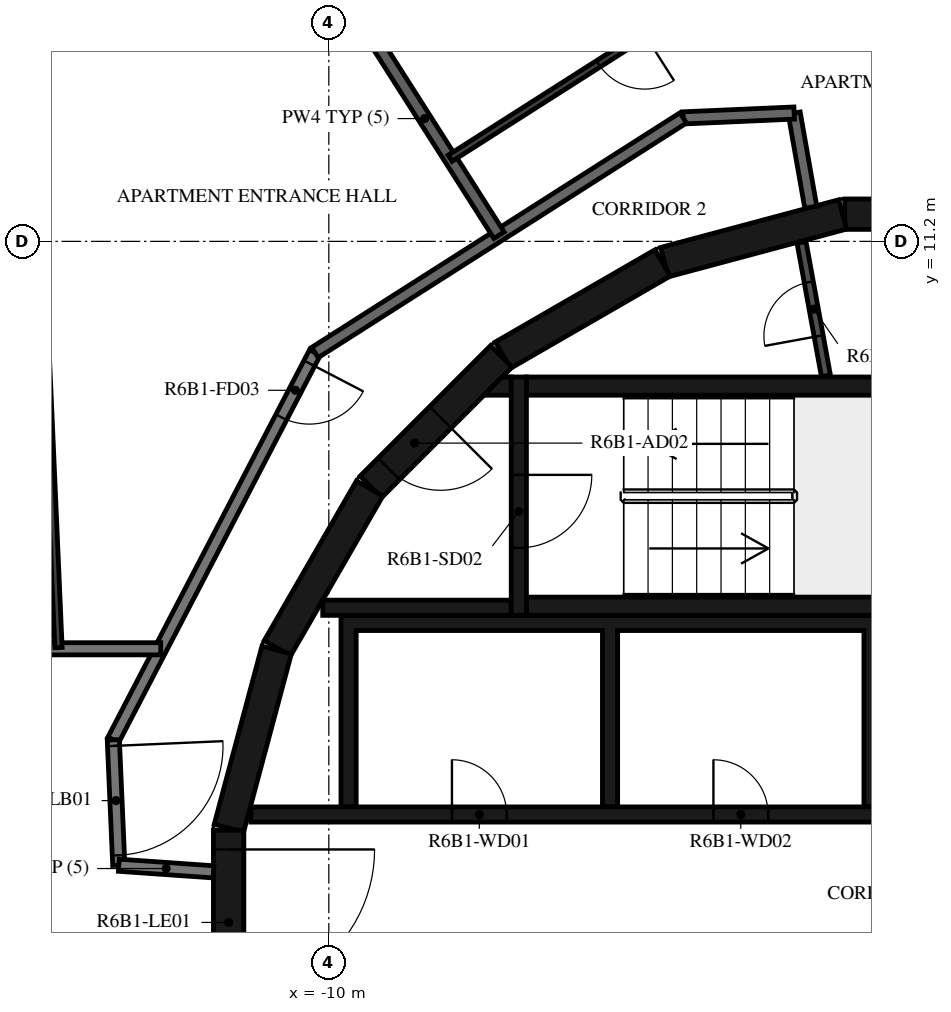
"""IFC4 building model, lengths in metres.
Left out: names, types, materials, properties, quantities, classifications, styles, units other than length and angle.
Written with IfcOpenShell. Run it as: python <this file> out.ifc"""

import sys

from ifc_helpers import new_model, si_unit, direction, frame, frame_2d, origin, place, context, subcontext, project, spatial, polyline, rectangle, outline, extrude, element, fill, save


model = new_model("IFC4")
c1 = context("Model", 3, precision=1e-05, world=origin(), true_north=direction((0.0, 1.0)))
c2 = subcontext(c1, "Body", "Model", "MODEL_VIEW")
j1 = project(units=[si_unit("LENGTHUNIT", "METRE"), si_unit("PLANEANGLEUNIT", "RADIAN")], contexts=[c1])
p1 = place(None, origin())
s1 = spatial("IfcSite", under=j1, at=p1, CompositionType="ELEMENT")
p2 = place(p1, origin())
s2 = spatial("IfcBuilding", under=s1, at=p2, CompositionType="ELEMENT")
p3 = place(p2, frame((0.0, 0.0, 237.2)))
s3 = spatial("IfcBuildingStorey", under=s2, at=p3, CompositionType="ELEMENT", Elevation=237.2)
for number, where, z_axis, x_axis in (
    (1, (1.516, 11.647, 0.0), (0.0, 0.0, 1.0), (-1.0, 0.0, 0.0)),
    (2, (-1.55, 11.643, 0.0), (0.0, 0.0, 1.0), (-0.966, -0.259, 0.0)),
    (3, (-4.51, 10.845, 0.0), (0.0, 0.0, 1.0), (-0.866, -0.5, 0.0)),
):
    element("IfcWall", number, at=place(p3, frame(where, z_axis=z_axis, x_axis=x_axis)), inside=s3, PredefinedType="SHEAR", context=c2, shape_type="SweptSolid", body=[
        extrude(rectangle(XDim=3.033, YDim=0.5, at=frame_2d((1.516, 0.0))), origin(), (0.0, 0.0, 1.0), 3.12),
    ])
p4 = place(p3, frame((-7.164, 9.308, 0.0), z_axis=(0.0, 0.0, 1.0), x_axis=(-0.707106781187, -0.707106781187, 0.0)))
e4 = element("IfcWall", 4, at=p4, inside=s3, PredefinedType="SHEAR", context=c2, shape_type="SweptSolid", body=[
    extrude(rectangle(XDim=3.032, YDim=0.5, at=frame_2d((1.516, 0.0))), origin(), (0.0, 0.0, 1.0), 3.12),
])
p5 = place(p4, frame((1.416, 0.0, 0.0)))
e5 = element("IfcOpeningElement", 5, at=p5, cuts=e4, PredefinedType="OPENING", context=c2, shape_type="SweptSolid", body=[
    extrude(rectangle(XDim=1.2, YDim=2.1, at=frame_2d((0.6, 1.05))), frame((0.0, 0.26, 0.0), z_axis=(0.0, -1.0, 0.0), x_axis=(1.0, 0.0, 0.0)), (0.0, 0.0, 1.0), 0.52),
])
for number, where, z_axis, x_axis in (
    (6, (-9.329, 7.137, 0.0), (0.0, 0.0, 1.0), (-0.5, -0.866, 0.0)),
    (7, (-10.858, 4.479, 0.0), (0.0, 0.0, 1.0), (-0.259, -0.966, 0.0)),
):
    element("IfcWall", number, at=place(p3, frame(where, z_axis=z_axis, x_axis=x_axis)), inside=s3, PredefinedType="SHEAR", context=c2, shape_type="SweptSolid", body=[
        extrude(rectangle(XDim=3.033, YDim=0.5, at=frame_2d((1.516, 0.0))), origin(), (0.0, 0.0, 1.0), 3.12),
    ])
p6 = place(p3, frame((-11.647, 1.516, 0.0), z_axis=(0.0, 0.0, 1.0), x_axis=(0.0, -1.0, 0.0)))
e8 = element("IfcWall", 8, at=p6, inside=s3, PredefinedType="SHEAR", context=c2, shape_type="SweptSolid", body=[
    extrude(rectangle(XDim=3.033, YDim=0.5, at=frame_2d((1.516, 0.0))), origin(), (0.0, 0.0, 1.0), 3.12),
])
p7 = place(p6, frame((0.316, 0.0, 0.0)))
e9 = element("IfcOpeningElement", 9, at=p7, cuts=e8, PredefinedType="OPENING", context=c2, shape_type="SweptSolid", body=[
    extrude(rectangle(XDim=2.4, YDim=2.1, at=frame_2d((1.2, 1.05))), frame((0.0, 0.26, 0.0), z_axis=(0.0, -1.0, 0.0), x_axis=(1.0, 0.0, 0.0)), (0.0, 0.0, 1.0), 0.52),
])
for number, where, z_axis, x_axis in (
    (10, (-6.75, 5.2, 0.0), (0.0, 0.0, 1.0), (1.0, 0.0, 0.0)),
    (11, (-6.75, 8.82, 0.0), (0.0, 0.0, 1.0), (1.0, 0.0, 0.0)),
):
    element("IfcWall", number, at=place(p3, frame(where, z_axis=z_axis, x_axis=x_axis)), inside=s3, PredefinedType="SHEAR", context=c2, shape_type="SweptSolid", body=[
        extrude(rectangle(XDim=6.75, YDim=0.3, at=frame_2d((3.375, 0.0))), origin(), (0.0, 0.0, 1.0), 3.12),
    ])
p8 = place(p3, frame((-6.875, 8.97, 0.0), z_axis=(0.0, 0.0, 1.0), x_axis=(0.0, -1.0, 0.0)))
e12 = element("IfcWall", 12, at=p8, inside=s3, PredefinedType="SHEAR", context=c2, shape_type="SweptSolid", body=[
    extrude(rectangle(XDim=3.92, YDim=0.25, at=frame_2d((1.96, 0.0))), origin(), (0.0, 0.0, 1.0), 3.12),
])
p9 = place(p8, frame((1.61, 0.0, 0.0)))
e13 = element("IfcOpeningElement", 13, at=p9, cuts=e12, PredefinedType="OPENING", context=c2, shape_type="SweptSolid", body=[
    extrude(rectangle(XDim=1.2, YDim=2.1, at=frame_2d((0.6, 1.05))), frame((0.0, 0.135, 0.0), z_axis=(0.0, -1.0, 0.0), x_axis=(1.0, 0.0, 0.0)), (0.0, 0.0, 1.0), 0.27),
])
p10 = place(p3, frame((-7.0, 5.175, 0.0), z_axis=(0.0, 0.0, 1.0), x_axis=(-1.0, 0.0, 0.0)))
e14 = element("IfcWall", 14, at=p10, inside=s3, PredefinedType="SHEAR", context=c2, shape_type="SweptSolid", body=[
    extrude(rectangle(XDim=3.1, YDim=0.25, at=frame_2d((1.55, 0.0))), origin(), (0.0, 0.0, 1.0), 3.12),
])
p11 = place(p3, origin())
e15 = element("IfcWall", 15, at=p11, inside=s3, PredefinedType="SHEAR", context=c2, shape_type="SweptSolid", body=[
    extrude(outline(polyline([(-7.148, 8.97), (-7.0, 8.97), (-7.0, 8.67), (-7.448, 8.67), (-7.148, 8.97)])), origin(), (0.0, 0.0, 1.0), 3.12),
])
p12 = place(p3, origin())
e16 = element("IfcWall", 16, at=p12, inside=s3, PredefinedType="SHEAR", context=c2, shape_type="SweptSolid", body=[
    extrude(outline(polyline([(-9.55, 4.8), (-5.5, 4.8), (-5.5, 1.9), (-5.25, 1.9), (-5.25, 4.8), (-1.2, 4.8), (-1.2, 1.9), (-0.95, 1.9), (-0.95, 4.8), (0.95, 4.8), (0.95, 1.9), (1.2, 1.9), (1.2, 4.8), (3.1, 4.8), (3.1, 1.9), (3.35, 1.9), (3.35, 4.8), (5.25, 4.8), (5.25, 1.9), (5.5, 1.9), (5.5, 4.8), (7.4, 4.8), (7.4, 1.9), (7.65, 1.9), (7.65, 4.8), (9.55, 4.8), (9.55, 1.9), (9.8, 1.9), (9.8, 4.8), (9.8, 5.05), (-9.8, 5.05), (-9.8, 4.8), (-9.8, 1.9), (-9.55, 1.9), (-9.55, 4.8)])), origin(), (0.0, 0.0, 1.0), 3.12),
])
p13 = place(p3, frame((-11.28, 1.775, 0.0), z_axis=(0.0, 0.0, 1.0), x_axis=(1.0, 0.0, 0.0)))
e17 = element("IfcWall", 17, at=p13, inside=s3, PredefinedType="SHEAR", context=c2, shape_type="SweptSolid", body=[
    extrude(rectangle(XDim=14.38, YDim=0.25, at=frame_2d((7.19, 0.0))), origin(), (0.0, 0.0, 1.0), 3.12),
])
p14 = place(p13, frame((10.73, 0.0, 0.0)))
e18 = element("IfcOpeningElement", 18, at=p14, cuts=e17, PredefinedType="OPENING", context=c2, shape_type="SweptSolid", body=[
    extrude(rectangle(XDim=1.1, YDim=2.1, at=frame_2d((0.55, 1.05))), frame((0.0, 0.135, 0.0), z_axis=(0.0, -1.0, 0.0), x_axis=(1.0, 0.0, 0.0)), (0.0, 0.0, 1.0), 0.27),
])
p15 = place(p13, frame((12.88, 0.0, 0.0)))
e19 = element("IfcOpeningElement", 19, at=p15, cuts=e17, PredefinedType="OPENING", context=c2, shape_type="SweptSolid", body=[
    extrude(rectangle(XDim=1.1, YDim=2.1, at=frame_2d((0.55, 1.05))), frame((0.0, 0.135, 0.0), z_axis=(0.0, -1.0, 0.0), x_axis=(1.0, 0.0, 0.0)), (0.0, 0.0, 1.0), 0.27),
])
p16 = place(p13, frame((3.305, 0.0, 0.0)))
e20 = element("IfcOpeningElement", 20, at=p16, cuts=e17, PredefinedType="OPENING", context=c2, shape_type="SweptSolid", body=[
    extrude(rectangle(XDim=0.9, YDim=2.1, at=frame_2d((0.45, 1.05))), frame((0.0, 0.135, 0.0), z_axis=(0.0, -1.0, 0.0), x_axis=(1.0, 0.0, 0.0)), (0.0, 0.0, 1.0), 0.27),
])
p17 = place(p13, frame((7.605, 0.0, 0.0)))
e21 = element("IfcOpeningElement", 21, at=p17, cuts=e17, PredefinedType="OPENING", context=c2, shape_type="SweptSolid", body=[
    extrude(rectangle(XDim=0.9, YDim=2.1, at=frame_2d((0.45, 1.05))), frame((0.0, 0.135, 0.0), z_axis=(0.0, -1.0, 0.0), x_axis=(1.0, 0.0, 0.0)), (0.0, 0.0, 1.0), 0.27),
])
p18 = place(p3, frame((-1.825, 8.99, 0.0), z_axis=(0.0, 0.0, 1.0), x_axis=(-0.179955206115, 0.983674805915, 0.0)))
e22 = element("IfcWall", 22, at=p18, inside=s3, PredefinedType="PARTITIONING", context=c2, shape_type="SweptSolid", body=[
    extrude(rectangle(XDim=2.229, YDim=0.15, at=frame_2d((1.115, 0.0))), origin(), (0.0, 0.0, 1.0), 3.12),
])
p19 = place(p18, frame((0.665, 0.0, 0.0)))
e23 = element("IfcOpeningElement", 23, at=p19, cuts=e22, PredefinedType="OPENING", context=c2, shape_type="SweptSolid", body=[
    extrude(rectangle(XDim=0.9, YDim=2.1, at=frame_2d((0.45, 1.05))), frame((0.0, 0.085, 0.0), z_axis=(0.0, -1.0, 0.0), x_axis=(1.0, 0.0, 0.0)), (0.0, 0.0, 1.0), 0.17),
])
p20 = place(p3, frame((-10.228, 9.372, 0.0), z_axis=(0.0, 0.0, 1.0), x_axis=(-0.461759464021, -0.887005184532, 0.0)))
e24 = element("IfcWall", 24, at=p20, inside=s3, PredefinedType="STANDARD", context=c2, shape_type="SweptSolid", body=[
    extrude(rectangle(XDim=7.181, YDim=0.2, at=frame_2d((3.591, 0.0))), origin(), (0.0, 0.0, 1.0), 3.12),
])
p21 = place(p20, frame((0.2, 0.0, 0.0)))
e25 = element("IfcOpeningElement", 25, at=p21, cuts=e24, PredefinedType="OPENING", context=c2, shape_type="SweptSolid", body=[
    extrude(rectangle(XDim=1.0, YDim=2.1, at=frame_2d((0.5, 1.05))), frame((0.0, 0.11, 0.0), z_axis=(0.0, -1.0, 0.0), x_axis=(1.0, 0.0, 0.0)), (0.0, 0.0, 1.0), 0.22),
])
p22 = place(p3, frame((-13.544, 3.003, 0.0), z_axis=(0.0, 0.0, 1.0), x_axis=(0.043652842459, -0.99904676034, 0.0)))
e26 = element("IfcWall", 26, at=p22, inside=s3, PredefinedType="STANDARD", context=c2, shape_type="SweptSolid", body=[
    extrude(rectangle(XDim=2.064, YDim=0.2, at=frame_2d((1.032, 0.0))), origin(), (0.0, 0.0, 1.0), 3.12),
])
p23 = place(p22, frame((0.1, 0.0, 0.0)))
e27 = element("IfcOpeningElement", 27, at=p23, cuts=e26, PredefinedType="OPENING", context=c2, shape_type="SweptSolid", body=[
    extrude(rectangle(XDim=1.8, YDim=2.1, at=frame_2d((0.9, 1.05))), frame((0.0, 0.11, 0.0), z_axis=(0.0, -1.0, 0.0), x_axis=(1.0, 0.0, 0.0)), (0.0, 0.0, 1.0), 0.22),
])
p24 = place(p3, frame((-13.454, 0.941, 0.0), z_axis=(0.0, 0.0, 1.0), x_axis=(0.99755155062, -0.069934997354, 0.0)))
e28 = element("IfcWall", 28, at=p24, inside=s3, PredefinedType="STANDARD", context=c2, shape_type="SweptSolid", body=[
    extrude(rectangle(XDim=1.561, YDim=0.2, at=frame_2d((0.78, 0.0))), origin(), (0.0, 0.0, 1.0), 3.12),
])
p25 = place(p3, frame((-2.074, 11.761, 0.0), z_axis=(0.0, 0.0, 1.0), x_axis=(-0.173679082312, 0.984802303189, 0.0)))
e29 = element("IfcWall", 29, at=p25, inside=s3, PredefinedType="STANDARD", context=c2, shape_type="SweptSolid", body=[
    extrude(rectangle(XDim=1.573, YDim=0.2, at=frame_2d((0.787, 0.0))), origin(), (0.0, 0.0, 1.0), 3.12),
])
p26 = place(p3, frame((-2.347, 13.31, 0.0), z_axis=(0.0, 0.0, 1.0), x_axis=(-0.999050095671, -0.043576442492, 0.0)))
e30 = element("IfcWall", 30, at=p26, inside=s3, PredefinedType="STANDARD", context=c2, shape_type="SweptSolid", body=[
    extrude(rectangle(XDim=1.826, YDim=0.2, at=frame_2d((0.913, 0.0))), origin(), (0.0, 0.0, 1.0), 3.12),
])
p27 = place(p3, frame((-4.172, 13.231, 0.0), z_axis=(0.0, 0.0, 1.0), x_axis=(-0.843388394728, -0.537304397561, 0.0)))
e31 = element("IfcWall", 31, at=p27, inside=s3, PredefinedType="STANDARD", context=c2, shape_type="SweptSolid", body=[
    extrude(rectangle(XDim=7.181, YDim=0.2, at=frame_2d((3.59, 0.0))), origin(), (0.0, 0.0, 1.0), 3.12),
])
p28 = place(p3, frame((-12.764, 4.5, 0.0), z_axis=(0.0, 0.0, 1.0), x_axis=(-1.0, 0.0, 0.0)))
e32 = element("IfcWall", 32, at=p28, inside=s3, PredefinedType="STANDARD", context=c2, shape_type="SweptSolid", body=[
    extrude(rectangle(XDim=4.086, YDim=0.2, at=frame_2d((2.043, 0.0))), origin(), (0.0, 0.0, 1.0), 3.12),
])
p29 = place(p3, frame((-9.645, 15.138, 0.0), z_axis=(0.0, 0.0, 1.0), x_axis=(0.537267800866, -0.84341170857, 0.0)))
e33 = element("IfcWall", 33, at=p29, inside=s3, PredefinedType="STANDARD", context=c2, shape_type="SweptSolid", body=[
    extrude(rectangle(XDim=4.55, YDim=0.2, at=frame_2d((2.275, 0.0))), origin(), (0.0, 0.0, 1.0), 3.12),
])
p30 = place(p3, frame((-4.639, 14.712, 0.0), z_axis=(0.0, 0.0, 1.0), x_axis=(-0.843376843237, -0.537322529113, 0.0)))
e34 = element("IfcWall", 34, at=p30, inside=s3, PredefinedType="PARTITIONING", context=c2, shape_type="SweptSolid", body=[
    extrude(rectangle(XDim=3.992, YDim=0.12, at=frame_2d((1.996, 0.0))), origin(), (0.0, 0.0, 1.0), 3.12),
])
p31 = place(p30, frame((0.2, 0.0, 0.0)))
e35 = element("IfcOpeningElement", 35, at=p31, cuts=e34, PredefinedType="OPENING", context=c2, shape_type="SweptSolid", body=[
    extrude(rectangle(XDim=0.9, YDim=2.1, at=frame_2d((0.45, 1.05))), frame((0.0, 0.07, 0.0), z_axis=(0.0, -1.0, 0.0), x_axis=(1.0, 0.0, 0.0)), (0.0, 0.0, 1.0), 0.14),
])
p32 = place(p3, frame((-14.955, 16.187, 0.0), z_axis=(0.0, 0.0, 1.0), x_axis=(0.04360777668, -0.999048728448, 0.0)))
e36 = element("IfcWall", 36, at=p32, inside=s3, PredefinedType="PARTITIONING", context=c2, shape_type="SweptSolid", body=[
    extrude(rectangle(XDim=11.679, YDim=0.12, at=frame_2d((5.839, 0.0))), origin(), (0.0, 0.0, 1.0), 3.12),
])
p33 = place(p32, frame((0.709, 0.0, 0.0)))
e37 = element("IfcOpeningElement", 37, at=p33, cuts=e36, PredefinedType="OPENING", context=c2, shape_type="SweptSolid", body=[
    extrude(rectangle(XDim=0.9, YDim=2.1, at=frame_2d((0.45, 1.05))), frame((0.0, 0.07, 0.0), z_axis=(0.0, -1.0, 0.0), x_axis=(1.0, 0.0, 0.0)), (0.0, 0.0, 1.0), 0.14),
])
p34 = place(p9, origin())
e38 = element("IfcDoor", 38, at=p34, inside=s3, OperationType="SINGLE_SWING_LEFT", PredefinedType="DOOR", context=c2, shape_type="SweptSolid", body=[
    extrude(rectangle(XDim=1.2, YDim=2.1, at=frame_2d((0.6, 1.05))), frame((0.0, 0.025, 0.0), z_axis=(0.0, -1.0, 0.0), x_axis=(1.0, 0.0, 0.0)), (0.0, 0.0, 1.0), 0.05),
])
fill(e13, e38)
p35 = place(p5, origin())
e39 = element("IfcDoor", 39, at=p35, inside=s3, OperationType="SINGLE_SWING_RIGHT", PredefinedType="DOOR", context=c2, shape_type="SweptSolid", body=[
    extrude(rectangle(XDim=1.2, YDim=2.1, at=frame_2d((0.6, 1.05))), frame((0.0, 0.025, 0.0), z_axis=(0.0, -1.0, 0.0), x_axis=(1.0, 0.0, 0.0)), (0.0, 0.0, 1.0), 0.05),
])
fill(e5, e39)
p36 = place(p7, origin())
e40 = element("IfcDoor", 40, at=p36, inside=s3, OperationType="DOUBLE_DOOR_SINGLE_SWING", PredefinedType="DOOR", context=c2, shape_type="SweptSolid", body=[
    extrude(rectangle(XDim=2.4, YDim=2.1, at=frame_2d((1.2, 1.05))), frame((0.0, 0.025, 0.0), z_axis=(0.0, -1.0, 0.0), x_axis=(1.0, 0.0, 0.0)), (0.0, 0.0, 1.0), 0.05),
])
fill(e9, e40)
p37 = place(p16, origin())
e41 = element("IfcDoor", 41, at=p37, inside=s3, OperationType="SINGLE_SWING_LEFT", PredefinedType="DOOR", context=c2, shape_type="SweptSolid", body=[
    extrude(rectangle(XDim=0.9, YDim=2.1, at=frame_2d((0.45, 1.05))), frame((0.0, 0.025, 0.0), z_axis=(0.0, -1.0, 0.0), x_axis=(1.0, 0.0, 0.0)), (0.0, 0.0, 1.0), 0.05),
])
fill(e20, e41)
p38 = place(p17, origin())
e42 = element("IfcDoor", 42, at=p38, inside=s3, OperationType="SINGLE_SWING_RIGHT", PredefinedType="DOOR", context=c2, shape_type="SweptSolid", body=[
    extrude(rectangle(XDim=0.9, YDim=2.1, at=frame_2d((0.45, 1.05))), frame((0.0, 0.025, 0.0), z_axis=(0.0, -1.0, 0.0), x_axis=(1.0, 0.0, 0.0)), (0.0, 0.0, 1.0), 0.05),
])
fill(e21, e42)
p39 = place(p19, origin())
e43 = element("IfcDoor", 43, at=p39, inside=s3, OperationType="SINGLE_SWING_LEFT", PredefinedType="DOOR", context=c2, shape_type="SweptSolid", body=[
    extrude(rectangle(XDim=0.9, YDim=2.1, at=frame_2d((0.45, 1.05))), frame((0.0, 0.025, 0.0), z_axis=(0.0, -1.0, 0.0), x_axis=(1.0, 0.0, 0.0)), (0.0, 0.0, 1.0), 0.05),
])
fill(e23, e43)
p40 = place(p31, origin())
e44 = element("IfcDoor", 44, at=p40, inside=s3, OperationType="SINGLE_SWING_RIGHT", PredefinedType="DOOR", context=c2, shape_type="SweptSolid", body=[
    extrude(rectangle(XDim=0.9, YDim=2.1, at=frame_2d((0.45, 1.05))), frame((0.0, 0.025, 0.0), z_axis=(0.0, -1.0, 0.0), x_axis=(1.0, 0.0, 0.0)), (0.0, 0.0, 1.0), 0.05),
])
fill(e35, e44)
p41 = place(p21, origin())
e45 = element("IfcDoor", 45, at=p41, inside=s3, OperationType="SINGLE_SWING_LEFT", PredefinedType="DOOR", context=c2, shape_type="SweptSolid", body=[
    extrude(rectangle(XDim=1.0, YDim=2.1, at=frame_2d((0.5, 1.05))), frame((0.0, 0.025, 0.0), z_axis=(0.0, -1.0, 0.0), x_axis=(1.0, 0.0, 0.0)), (0.0, 0.0, 1.0), 0.05),
])
fill(e25, e45)
p42 = place(p23, origin())
e46 = element("IfcDoor", 46, at=p42, inside=s3, OperationType="DOUBLE_DOOR_SINGLE_SWING", PredefinedType="DOOR", context=c2, shape_type="SweptSolid", body=[
    extrude(rectangle(XDim=1.8, YDim=2.1, at=frame_2d((0.9, 1.05))), frame((0.0, 0.025, 0.0), z_axis=(0.0, -1.0, 0.0), x_axis=(1.0, 0.0, 0.0)), (0.0, 0.0, 1.0), 0.05),
])
fill(e27, e46)
save(model, sys.argv[1])
